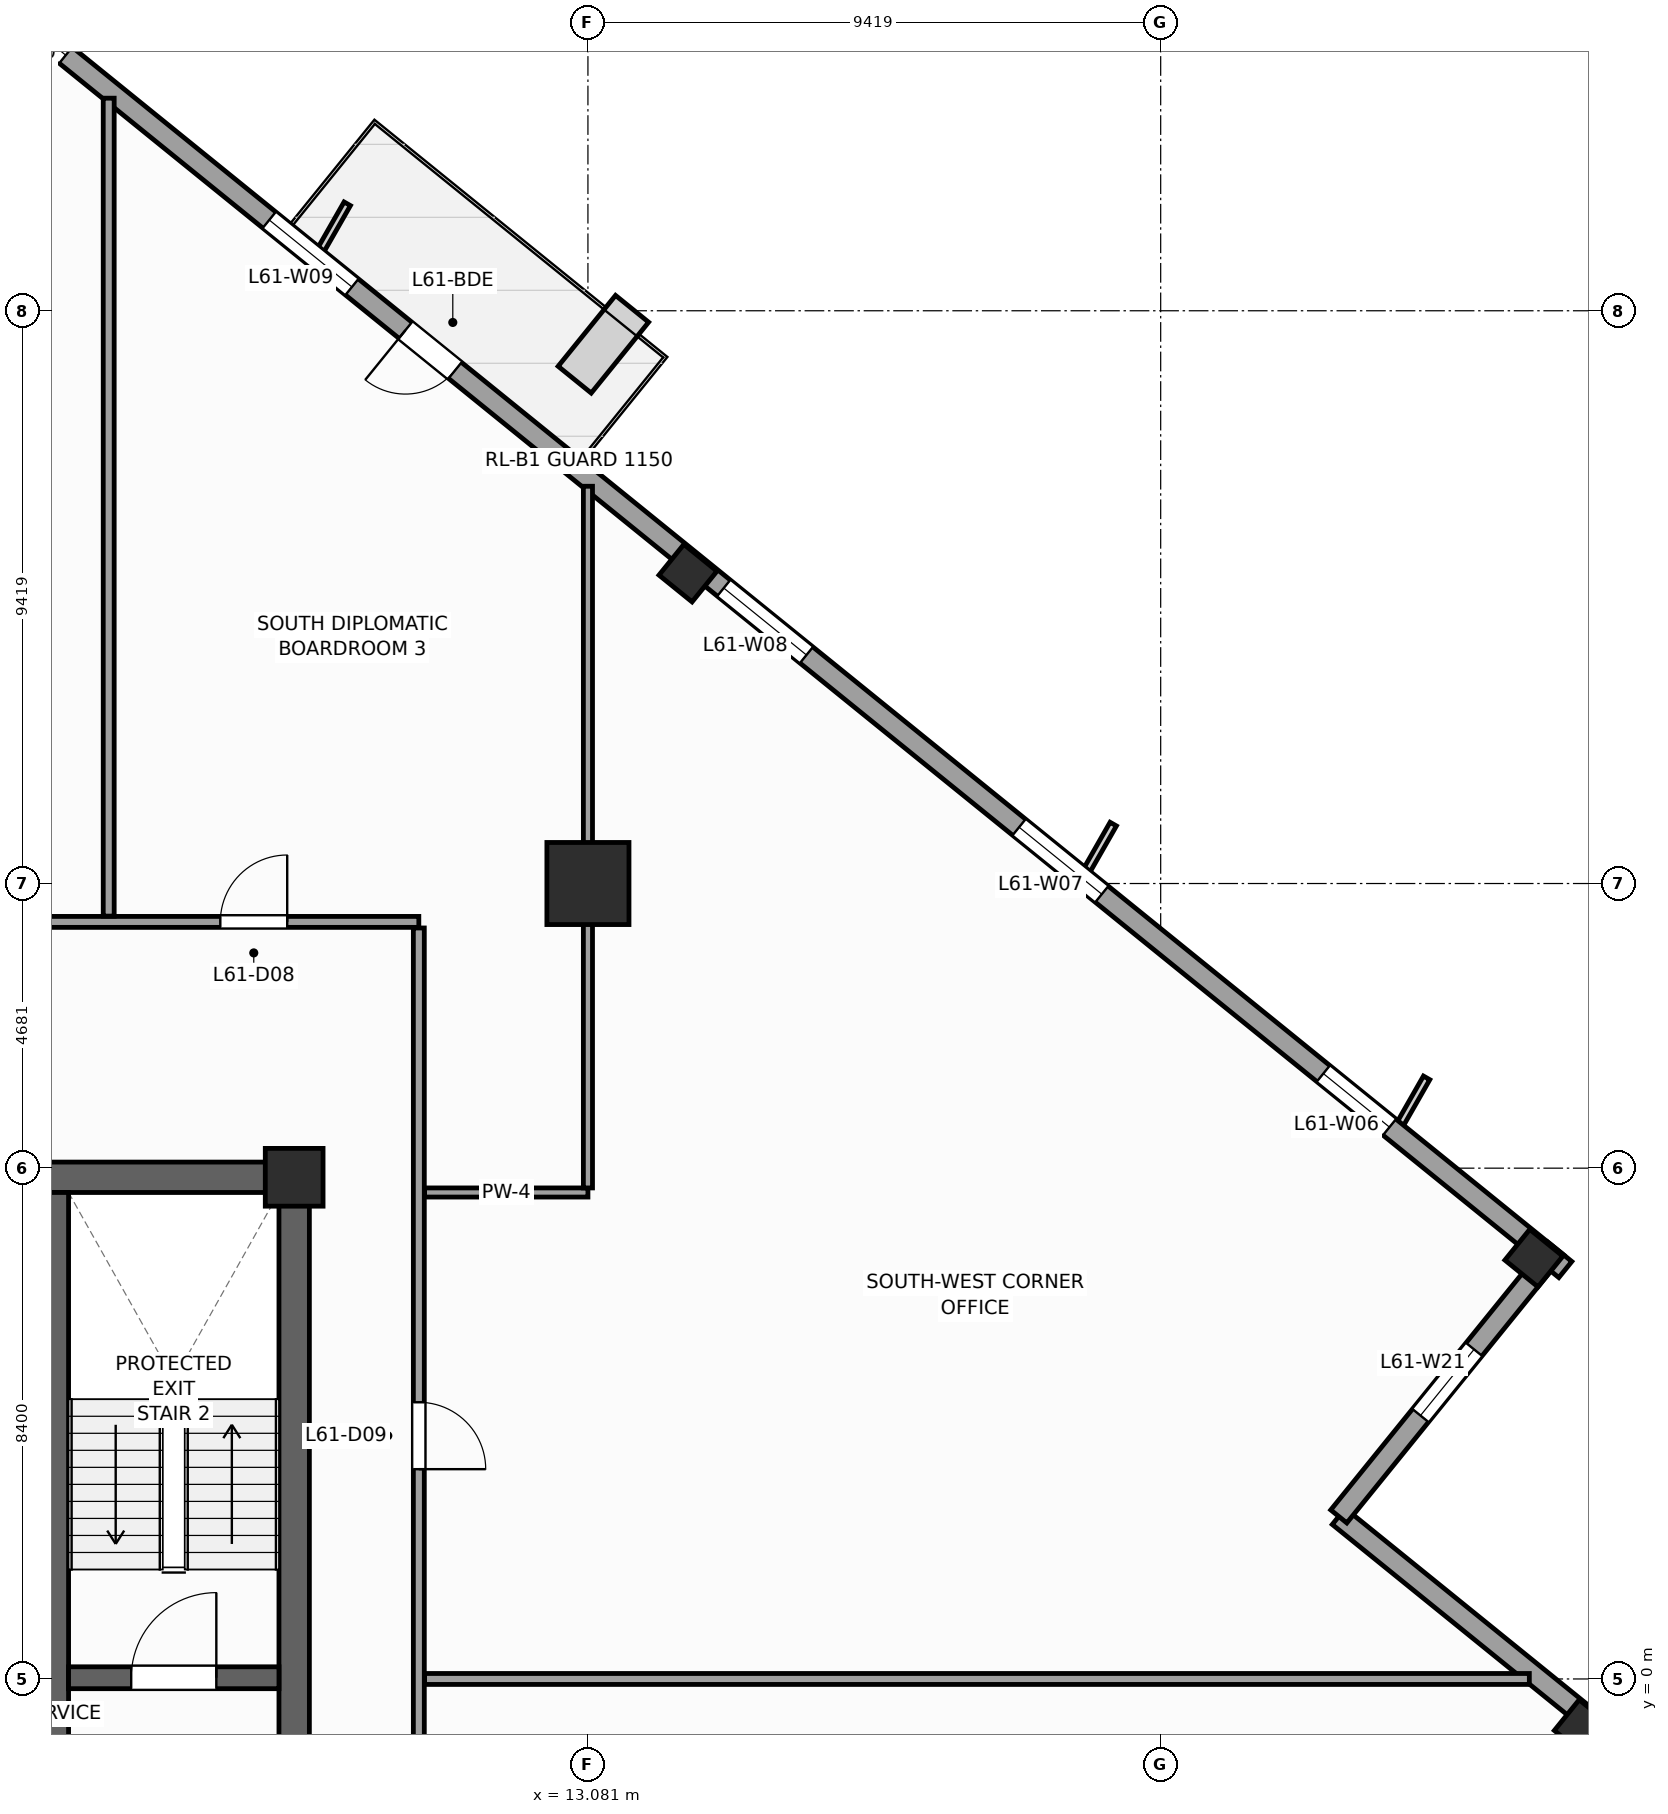
"""IFC4 building model, lengths in metres.
Left out: names, types, materials, properties, quantities, classifications, styles, units other than length and angle.
Written with IfcOpenShell. Run it as: python <this file> out.ifc"""

import sys

from ifc_helpers import new_model, si_unit, direction, frame, frame_2d, origin, origin_2d, place, context, subcontext, project, spatial, rectangle, extrude, source, transform, mapped, element, fill, save


model = new_model("IFC4")
c1 = context("Model", 3, precision=1e-05, world=origin(), true_north=direction((0.0, 1.0)))
c2 = subcontext(c1, "Body", "Model", "MODEL_VIEW")
j1 = project(units=[si_unit("LENGTHUNIT", "METRE"), si_unit("PLANEANGLEUNIT", "RADIAN")], contexts=[c1])
p1 = place(None, origin())
s1 = spatial("IfcSite", under=j1, at=p1, CompositionType="ELEMENT")
p2 = place(p1, origin())
s2 = spatial("IfcBuilding", under=s1, at=p2, CompositionType="ELEMENT")
p3 = place(p2, frame((0.0, 0.0, 252.4)))
s3 = spatial("IfcBuildingStorey", under=s2, at=p3, CompositionType="ELEMENT", Elevation=252.4)
p4 = place(p3, frame((-8.5, 8.25, 0.0), z_axis=(0.0, 0.0, 1.0), x_axis=(1.0, 0.0, 0.0)))
e1 = element("IfcWall", 1, at=p4, inside=s3, PredefinedType="SHEAR", context=c2, shape_type="SweptSolid", body=[
    extrude(rectangle(XDim=17.0, YDim=0.5, at=frame_2d((8.5, 0.0))), origin(), (0.0, 0.0, 1.0), 3.9),
])
p5 = place(p3, frame((8.25, -8.0, 0.0), z_axis=(0.0, 0.0, 1.0), x_axis=(0.0, 1.0, 0.0)))
e2 = element("IfcWall", 2, at=p5, inside=s3, PredefinedType="SHEAR", context=c2, shape_type="SweptSolid", body=[
    extrude(rectangle(XDim=16.0, YDim=0.5, at=frame_2d((8.0, 0.0))), origin(), (0.0, 0.0, 1.0), 3.9),
])
p6 = place(p5, frame((4.69, 0.0, 0.0)))
e3 = element("IfcOpeningElement", 3, at=p6, cuts=e2, PredefinedType="OPENING", context=c2, shape_type="SweptSolid", body=[
    extrude(rectangle(XDim=1.3, YDim=2.2, at=frame_2d((0.65, 1.1))), frame((0.0, 0.26, 0.0), z_axis=(0.0, -1.0, 0.0), x_axis=(1.0, 0.0, 0.0)), (0.0, 0.0, 1.0), 0.52),
])
p7 = place(p3, frame((4.36, -8.0, 0.0), z_axis=(0.0, 0.0, 1.0), x_axis=(0.0, 1.0, 0.0)))
e4 = element("IfcWall", 4, at=p7, inside=s3, PredefinedType="SHEAR", context=c2, shape_type="SweptSolid", body=[
    extrude(rectangle(XDim=16.0, YDim=0.36, at=frame_2d((8.0, 0.0))), origin(), (0.0, 0.0, 1.0), 3.9),
])
p8 = place(p3, frame((4.54, 0.02, 0.0), z_axis=(0.0, 0.0, 1.0), x_axis=(1.0, 0.0, 0.0)))
e5 = element("IfcWall", 5, at=p8, inside=s3, PredefinedType="SHEAR", context=c2, shape_type="SweptSolid", body=[
    extrude(rectangle(XDim=3.46, YDim=0.36, at=frame_2d((1.73, 0.0))), origin(), (0.0, 0.0, 1.0), 3.9),
])
p9 = place(p8, frame((1.03, 0.0, 0.0)))
e6 = element("IfcOpeningElement", 6, at=p9, cuts=e5, PredefinedType="OPENING", context=c2, shape_type="SweptSolid", body=[
    extrude(rectangle(XDim=1.4, YDim=2.2, at=frame_2d((0.7, 1.1))), frame((0.0, 0.19, 0.0), z_axis=(0.0, -1.0, 0.0), x_axis=(1.0, 0.0, 0.0)), (0.0, 0.0, 1.0), 0.38),
])
m1 = source(origin(), c2, "Body", "SweptSolid", [
    extrude(rectangle(XDim=0.95, YDim=0.95, at=origin_2d()), origin(), (0.0, 0.0, 1.0), 3.9),
])
p10 = place(p3, frame((8.25, 8.25, 0.0), z_axis=(0.0, 0.0, 1.0), x_axis=(1.0, 0.0, 0.0)))
e7 = element("IfcColumn", 7, at=p10, inside=s3, PredefinedType="PILASTER", context=c2, shape_type="MappedRepresentation", body=[
    mapped(m1, transform((0.0, 0.0, 0.0), scale=1.0)),
])
m2 = source(origin(), c2, "Body", "SweptSolid", [
    extrude(rectangle(XDim=1.35, YDim=1.35, at=origin_2d()), origin(), (0.0, 0.0, 1.0), 3.9),
])
p11 = place(p3, frame((13.081, 13.081, 0.0), z_axis=(0.0, 0.0, 1.0), x_axis=(1.0, 0.0, 0.0)))
e8 = element("IfcColumn", 8, at=p11, inside=s3, PredefinedType="COLUMN", context=c2, shape_type="MappedRepresentation", body=[
    mapped(m2, transform((0.0, 0.0, 0.0), scale=1.0)),
])
m3 = source(origin(), c2, "Body", "SweptSolid", [
    extrude(rectangle(XDim=0.65, YDim=0.7, at=origin_2d()), origin(), (0.0, 0.0, 1.0), 3.9),
])
for number, where, z_axis, x_axis in (
    (9, (29.45, -0.815, 0.0), (0.0, 0.0, 1.0), (0.629, 0.777, 0.0)),
    (10, (28.637, 6.92, 0.0), (0.0, 0.0, 1.0), (0.629, 0.777, 0.0)),
    (11, (14.726, 18.185, 0.0), (0.0, 0.0, 1.0), (0.629, 0.777, 0.0)),
):
    element("IfcColumn", number, at=place(p3, frame(where, z_axis=z_axis, x_axis=x_axis)), inside=s3, PredefinedType="COLUMN", context=c2, shape_type="MappedRepresentation", body=[
        mapped(m3, transform((0.0, 0.0, 0.0), scale=1.0)),
    ])
p12 = place(p3, frame((6.733, -29.154, 0.0), z_axis=(0.0, 0.0, 1.0), x_axis=(0.629325378072, 0.77714192302, 0.0)))
e12 = element("IfcWall", 12, at=p12, inside=s3, PredefinedType="STANDARD", context=c2, shape_type="SweptSolid", body=[
    extrude(rectangle(XDim=36.84, YDim=0.34, at=frame_2d((18.42, 0.0))), origin(), (0.0, 0.0, 1.0), 2.96),
])
p13 = place(p12, frame((3.721, 0.0, 0.48)))
e13 = element("IfcOpeningElement", 13, at=p13, cuts=e12, PredefinedType="OPENING", context=c2, shape_type="SweptSolid", body=[
    extrude(rectangle(XDim=1.4, YDim=2.4, at=frame_2d((0.7, 1.2))), frame((0.0, 0.18, 0.0), z_axis=(0.0, -1.0, 0.0), x_axis=(1.0, 0.0, 0.0)), (0.0, 0.0, 1.0), 0.36),
])
p14 = place(p12, frame((10.559, 0.0, 0.58)))
e14 = element("IfcOpeningElement", 14, at=p14, cuts=e12, PredefinedType="OPENING", context=c2, shape_type="SweptSolid", body=[
    extrude(rectangle(XDim=1.75, YDim=2.3, at=frame_2d((0.875, 1.15))), frame((0.0, 0.18, 0.0), z_axis=(0.0, -1.0, 0.0), x_axis=(1.0, 0.0, 0.0)), (0.0, 0.0, 1.0), 0.36),
])
p15 = place(p12, frame((16.058, 0.0, 0.58)))
e15 = element("IfcOpeningElement", 15, at=p15, cuts=e12, PredefinedType="OPENING", context=c2, shape_type="SweptSolid", body=[
    extrude(rectangle(XDim=1.75, YDim=2.3, at=frame_2d((0.875, 1.15))), frame((0.0, 0.18, 0.0), z_axis=(0.0, -1.0, 0.0), x_axis=(1.0, 0.0, 0.0)), (0.0, 0.0, 1.0), 0.36),
])
p16 = place(p12, frame((24.176, 0.0, 0.58)))
e16 = element("IfcOpeningElement", 16, at=p16, cuts=e12, PredefinedType="OPENING", context=c2, shape_type="SweptSolid", body=[
    extrude(rectangle(XDim=1.75, YDim=2.3, at=frame_2d((0.875, 1.15))), frame((0.0, 0.18, 0.0), z_axis=(0.0, -1.0, 0.0), x_axis=(1.0, 0.0, 0.0)), (0.0, 0.0, 1.0), 0.36),
])
p17 = place(p12, frame((30.982, 0.0, 0.48)))
e17 = element("IfcOpeningElement", 17, at=p17, cuts=e12, PredefinedType="OPENING", context=c2, shape_type="SweptSolid", body=[
    extrude(rectangle(XDim=1.4, YDim=2.4, at=frame_2d((0.7, 1.2))), frame((0.0, 0.18, 0.0), z_axis=(0.0, -1.0, 0.0), x_axis=(1.0, 0.0, 0.0)), (0.0, 0.0, 1.0), 0.36),
])
p18 = place(p3, frame((29.703, -0.789, 0.0), z_axis=(0.0, 0.0, 1.0), x_axis=(-0.77714355312, 0.629323365087, 0.0)))
e18 = element("IfcWall", 18, at=p18, inside=s3, PredefinedType="STANDARD", context=c2, shape_type="SweptSolid", body=[
    extrude(rectangle(XDim=5.5, YDim=0.34, at=frame_2d((2.75, 0.0))), origin(), (0.0, 0.0, 1.0), 3.66),
])
p19 = place(p3, frame((25.429, 2.673, 0.0), z_axis=(0.0, 0.0, 1.0), x_axis=(0.629299794138, 0.777162640055, 0.0)))
e19 = element("IfcWall", 19, at=p19, inside=s3, PredefinedType="STANDARD", context=c2, shape_type="SweptSolid", body=[
    extrude(rectangle(XDim=5.67, YDim=0.34, at=frame_2d((2.835, 0.0))), origin(), (0.0, 0.0, 1.0), 3.66),
])
p20 = place(p19, frame((2.135, 0.0, 0.48)))
e20 = element("IfcOpeningElement", 20, at=p20, cuts=e19, PredefinedType="OPENING", context=c2, shape_type="SweptSolid", body=[
    extrude(rectangle(XDim=1.4, YDim=2.4, at=frame_2d((0.7, 1.2))), frame((0.0, 0.18, 0.0), z_axis=(0.0, -1.0, 0.0), x_axis=(1.0, 0.0, 0.0)), (0.0, 0.0, 1.0), 0.36),
])
p21 = place(p3, frame((29.154, 6.733, 0.0), z_axis=(0.0, 0.0, 1.0), x_axis=(-0.77714192302, 0.629325378072, 0.0)))
e21 = element("IfcWall", 21, at=p21, inside=s3, PredefinedType="STANDARD", context=c2, shape_type="SweptSolid", body=[
    extrude(rectangle(XDim=36.84, YDim=0.34, at=frame_2d((18.42, 0.0))), origin(), (0.0, 0.0, 1.0), 2.96),
])
p22 = place(p21, frame((23.495, 0.0, 0.0)))
e22 = element("IfcOpeningElement", 22, at=p22, cuts=e21, PredefinedType="OPENING", context=c2, shape_type="SweptSolid", body=[
    extrude(rectangle(XDim=1.05, YDim=2.25, at=frame_2d((0.525, 1.125))), frame((0.0, 0.18, 0.0), z_axis=(0.0, -1.0, 0.0), x_axis=(1.0, 0.0, 0.0)), (0.0, 0.0, 1.0), 0.36),
])
p23 = place(p21, frame((3.721, 0.0, 0.48)))
e23 = element("IfcOpeningElement", 23, at=p23, cuts=e21, PredefinedType="OPENING", context=c2, shape_type="SweptSolid", body=[
    extrude(rectangle(XDim=1.4, YDim=2.4, at=frame_2d((0.7, 1.2))), frame((0.0, 0.18, 0.0), z_axis=(0.0, -1.0, 0.0), x_axis=(1.0, 0.0, 0.0)), (0.0, 0.0, 1.0), 0.36),
])
p24 = place(p21, frame((9.809, 0.0, 0.58)))
e24 = element("IfcOpeningElement", 24, at=p24, cuts=e21, PredefinedType="OPENING", context=c2, shape_type="SweptSolid", body=[
    extrude(rectangle(XDim=1.75, YDim=2.3, at=frame_2d((0.875, 1.15))), frame((0.0, 0.18, 0.0), z_axis=(0.0, -1.0, 0.0), x_axis=(1.0, 0.0, 0.0)), (0.0, 0.0, 1.0), 0.36),
])
p25 = place(p21, frame((16.058, 0.0, 0.58)))
e25 = element("IfcOpeningElement", 25, at=p25, cuts=e21, PredefinedType="OPENING", context=c2, shape_type="SweptSolid", body=[
    extrude(rectangle(XDim=1.75, YDim=2.3, at=frame_2d((0.875, 1.15))), frame((0.0, 0.18, 0.0), z_axis=(0.0, -1.0, 0.0), x_axis=(1.0, 0.0, 0.0)), (0.0, 0.0, 1.0), 0.36),
])
p26 = place(p21, frame((25.676, 0.0, 0.58)))
e26 = element("IfcOpeningElement", 26, at=p26, cuts=e21, PredefinedType="OPENING", context=c2, shape_type="SweptSolid", body=[
    extrude(rectangle(XDim=1.75, YDim=2.3, at=frame_2d((0.875, 1.15))), frame((0.0, 0.18, 0.0), z_axis=(0.0, -1.0, 0.0), x_axis=(1.0, 0.0, 0.0)), (0.0, 0.0, 1.0), 0.36),
])
p27 = place(p21, frame((31.732, 0.0, 0.48)))
e27 = element("IfcOpeningElement", 27, at=p27, cuts=e21, PredefinedType="OPENING", context=c2, shape_type="SweptSolid", body=[
    extrude(rectangle(XDim=1.4, YDim=2.4, at=frame_2d((0.7, 1.2))), frame((0.0, 0.18, 0.0), z_axis=(0.0, -1.0, 0.0), x_axis=(1.0, 0.0, 0.0)), (0.0, 0.0, 1.0), 0.36),
])
p28 = place(p3, frame((-11.35, 12.45, 0.0), z_axis=(0.0, 0.0, 1.0), x_axis=(1.0, 0.0, 0.0)))
e28 = element("IfcWall", 28, at=p28, inside=s3, PredefinedType="PARTITIONING", context=c2, shape_type="SweptSolid", body=[
    extrude(rectangle(XDim=21.65, YDim=0.18, at=frame_2d((10.825, 0.0))), origin(), (0.0, 0.0, 1.0), 3.66),
])
p29 = place(p28, frame((2.689, 0.0, 0.0)))
e29 = element("IfcOpeningElement", 29, at=p29, cuts=e28, PredefinedType="OPENING", context=c2, shape_type="SweptSolid", body=[
    extrude(rectangle(XDim=1.1, YDim=2.2, at=frame_2d((0.55, 1.1))), frame((0.0, 0.1, 0.0), z_axis=(0.0, -1.0, 0.0), x_axis=(1.0, 0.0, 0.0)), (0.0, 0.0, 1.0), 0.2),
])
p30 = place(p28, frame((8.2, 0.0, 0.0)))
e30 = element("IfcOpeningElement", 30, at=p30, cuts=e28, PredefinedType="OPENING", context=c2, shape_type="SweptSolid", body=[
    extrude(rectangle(XDim=1.1, YDim=2.2, at=frame_2d((0.55, 1.1))), frame((0.0, 0.1, 0.0), z_axis=(0.0, -1.0, 0.0), x_axis=(1.0, 0.0, 0.0)), (0.0, 0.0, 1.0), 0.2),
])
p31 = place(p28, frame((13.4, 0.0, 0.0)))
e31 = element("IfcOpeningElement", 31, at=p31, cuts=e28, PredefinedType="OPENING", context=c2, shape_type="SweptSolid", body=[
    extrude(rectangle(XDim=1.1, YDim=2.2, at=frame_2d((0.55, 1.1))), frame((0.0, 0.1, 0.0), z_axis=(0.0, -1.0, 0.0), x_axis=(1.0, 0.0, 0.0)), (0.0, 0.0, 1.0), 0.2),
])
p32 = place(p28, frame((18.385, 0.0, 0.0)))
e32 = element("IfcOpeningElement", 32, at=p32, cuts=e28, PredefinedType="OPENING", context=c2, shape_type="SweptSolid", body=[
    extrude(rectangle(XDim=1.1, YDim=2.2, at=frame_2d((0.55, 1.1))), frame((0.0, 0.1, 0.0), z_axis=(0.0, -1.0, 0.0), x_axis=(1.0, 0.0, 0.0)), (0.0, 0.0, 1.0), 0.2),
])
p33 = place(p3, frame((10.3, -11.3, 0.0), z_axis=(0.0, 0.0, 1.0), x_axis=(0.0, 1.0, 0.0)))
e33 = element("IfcWall", 33, at=p33, inside=s3, PredefinedType="PARTITIONING", context=c2, shape_type="SweptSolid", body=[
    extrude(rectangle(XDim=23.65, YDim=0.18, at=frame_2d((11.825, 0.0))), origin(), (0.0, 0.0, 1.0), 3.66),
])
p34 = place(p33, frame((14.75, 0.0, 0.0)))
e34 = element("IfcOpeningElement", 34, at=p34, cuts=e33, PredefinedType="OPENING", context=c2, shape_type="SweptSolid", body=[
    extrude(rectangle(XDim=1.1, YDim=2.2, at=frame_2d((0.55, 1.1))), frame((0.0, 0.1, 0.0), z_axis=(0.0, -1.0, 0.0), x_axis=(1.0, 0.0, 0.0)), (0.0, 0.0, 1.0), 0.2),
])
p35 = place(p33, frame((6.75, 0.0, 0.0)))
e35 = element("IfcOpeningElement", 35, at=p35, cuts=e33, PredefinedType="OPENING", context=c2, shape_type="SweptSolid", body=[
    extrude(rectangle(XDim=1.1, YDim=2.2, at=frame_2d((0.55, 1.1))), frame((0.0, 0.1, 0.0), z_axis=(0.0, -1.0, 0.0), x_axis=(1.0, 0.0, 0.0)), (0.0, 0.0, 1.0), 0.2),
])
p36 = place(p3, frame((5.2, 12.545, 0.0), z_axis=(0.0, 0.0, 1.0), x_axis=(0.0, 1.0, 0.0)))
e36 = element("IfcWall", 36, at=p36, inside=s3, PredefinedType="PARTITIONING", context=c2, shape_type="SweptSolid", body=[
    extrude(rectangle(XDim=13.451, YDim=0.18, at=frame_2d((6.726, 0.0))), origin(), (0.0, 0.0, 1.0), 3.66),
])
p37 = place(p3, frame((10.395, 0.0, 0.0), z_axis=(0.0, 0.0, 1.0), x_axis=(1.0, 0.0, 0.0)))
e37 = element("IfcWall", 37, at=p37, inside=s3, PredefinedType="PARTITIONING", context=c2, shape_type="SweptSolid", body=[
    extrude(rectangle(XDim=18.167, YDim=0.18, at=frame_2d((9.084, 0.0))), origin(), (0.0, 0.0, 1.0), 3.66),
])
p38 = place(p3, frame((10.395, 8.0, 0.0), z_axis=(0.0, 0.0, 1.0), x_axis=(1.0, 0.0, 0.0)))
e38 = element("IfcWall", 38, at=p38, inside=s3, PredefinedType="PARTITIONING", context=c2, shape_type="SweptSolid", body=[
    extrude(rectangle(XDim=2.686, YDim=0.15, at=frame_2d((1.343, 0.0))), origin(), (0.0, 0.0, 1.0), 3.66),
])
p39 = place(p3, frame((13.081, 8.075, 0.0), z_axis=(0.0, 0.0, 1.0), x_axis=(0.0, 1.0, 0.0)))
e39 = element("IfcWall", 39, at=p39, inside=s3, PredefinedType="PARTITIONING", context=c2, shape_type="SweptSolid", body=[
    extrude(rectangle(XDim=11.539, YDim=0.15, at=frame_2d((5.77, 0.0))), origin(), (0.0, 0.0, 1.0), 2.76),
])
m4 = source(origin(), c2, "Body", "SweptSolid", [
    extrude(rectangle(XDim=1.05, YDim=2.25, at=frame_2d((0.525, 1.125))), frame((0.0, 0.025, 0.0), z_axis=(0.0, -1.0, 0.0), x_axis=(1.0, 0.0, 0.0)), (0.0, 0.0, 1.0), 0.05),
])
p40 = place(p22, origin())
e40 = element("IfcDoor", 40, at=p40, inside=s3, OperationType="SINGLE_SWING_RIGHT", PredefinedType="DOOR", context=c2, shape_type="MappedRepresentation", body=[
    mapped(m4, transform((0.0, 0.0, 0.0), scale=1.0)),
])
fill(e22, e40)
m5 = source(origin(), c2, "Body", "SweptSolid", [
    extrude(rectangle(XDim=1.4, YDim=2.4, at=frame_2d((0.7, 1.2))), frame((0.0, 0.03, 0.0), z_axis=(0.0, -1.0, 0.0), x_axis=(1.0, 0.0, 0.0)), (0.0, 0.0, 1.0), 0.06),
])
p41 = place(p23, origin())
e41 = element("IfcWindow", 41, at=p41, inside=s3, PartitioningType="SINGLE_PANEL", PredefinedType="WINDOW", context=c2, shape_type="MappedRepresentation", body=[
    mapped(m5, transform((0.0, 0.0, 0.0), scale=1.0)),
])
fill(e23, e41)
m6 = source(origin(), c2, "Body", "SweptSolid", [
    extrude(rectangle(XDim=1.75, YDim=2.3, at=frame_2d((0.875, 1.15))), frame((0.0, 0.03, 0.0), z_axis=(0.0, -1.0, 0.0), x_axis=(1.0, 0.0, 0.0)), (0.0, 0.0, 1.0), 0.06),
])
p42 = place(p24, origin())
e42 = element("IfcWindow", 42, at=p42, inside=s3, PartitioningType="SINGLE_PANEL", PredefinedType="WINDOW", context=c2, shape_type="MappedRepresentation", body=[
    mapped(m6, transform((0.0, 0.0, 0.0), scale=1.0)),
])
fill(e24, e42)
p43 = place(p25, origin())
e43 = element("IfcWindow", 43, at=p43, inside=s3, PartitioningType="SINGLE_PANEL", PredefinedType="WINDOW", context=c2, shape_type="MappedRepresentation", body=[
    mapped(m6, transform((0.0, 0.0, 0.0), scale=1.0)),
])
fill(e25, e43)
p44 = place(p26, origin())
e44 = element("IfcWindow", 44, at=p44, inside=s3, PartitioningType="SINGLE_PANEL", PredefinedType="WINDOW", context=c2, shape_type="MappedRepresentation", body=[
    mapped(m6, transform((0.0, 0.0, 0.0), scale=1.0)),
])
fill(e26, e44)
p45 = place(p27, origin())
e45 = element("IfcWindow", 45, at=p45, inside=s3, PartitioningType="SINGLE_PANEL", PredefinedType="WINDOW", context=c2, shape_type="MappedRepresentation", body=[
    mapped(m5, transform((0.0, 0.0, 0.0), scale=1.0)),
])
fill(e27, e45)
p46 = place(p20, origin())
e46 = element("IfcWindow", 46, at=p46, inside=s3, PartitioningType="SINGLE_PANEL", PredefinedType="WINDOW", context=c2, shape_type="MappedRepresentation", body=[
    mapped(m5, transform((0.0, 0.0, 0.0), scale=1.0)),
])
fill(e20, e46)
m7 = source(origin(), c2, "Body", "SweptSolid", [
    extrude(rectangle(XDim=1.4, YDim=2.2, at=frame_2d((0.7, 1.1))), frame((0.0, 0.025, 0.0), z_axis=(0.0, -1.0, 0.0), x_axis=(1.0, 0.0, 0.0)), (0.0, 0.0, 1.0), 0.05),
])
p47 = place(p9, origin())
e47 = element("IfcDoor", 47, at=p47, inside=s3, OperationType="SINGLE_SWING_RIGHT", PredefinedType="DOOR", context=c2, shape_type="MappedRepresentation", body=[
    mapped(m7, transform((0.0, 0.0, 0.0), scale=1.0)),
])
fill(e6, e47)
m8 = source(origin(), c2, "Body", "SweptSolid", [
    extrude(rectangle(XDim=1.1, YDim=2.2, at=frame_2d((0.55, 1.1))), frame((0.0, 0.025, 0.0), z_axis=(0.0, -1.0, 0.0), x_axis=(1.0, 0.0, 0.0)), (0.0, 0.0, 1.0), 0.05),
])
p48 = place(p32, origin())
e48 = element("IfcDoor", 48, at=p48, inside=s3, OperationType="SINGLE_SWING_RIGHT", PredefinedType="DOOR", context=c2, shape_type="MappedRepresentation", body=[
    mapped(m8, transform((0.0, 0.0, 0.0), scale=1.0)),
])
fill(e32, e48)
p49 = place(p34, frame((1.1, 0.0, 0.0), z_axis=(0.0, 0.0, 1.0), x_axis=(-1.0, 0.0, 0.0)))
e49 = element("IfcDoor", 49, at=p49, inside=s3, OperationType="SINGLE_SWING_LEFT", PredefinedType="DOOR", context=c2, shape_type="MappedRepresentation", body=[
    mapped(m8, transform((0.0, 0.0, 0.0), scale=1.0)),
])
fill(e34, e49)
save(model, sys.argv[1])
